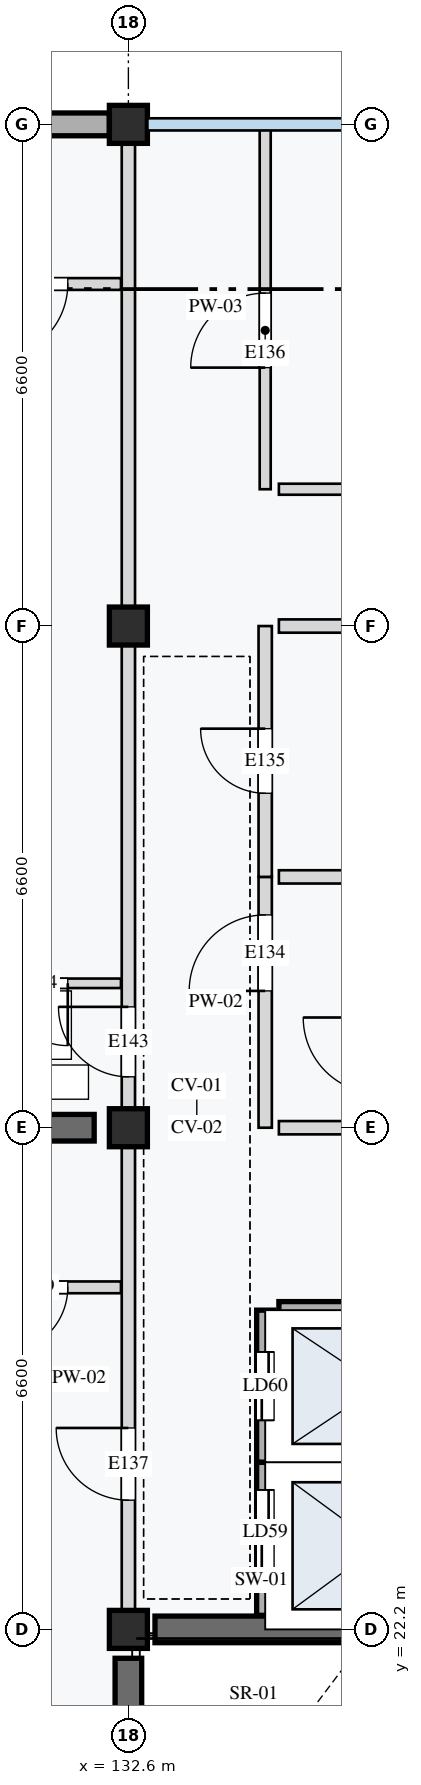
"""IFC4 building model, lengths in metres.
Left out: names, types, materials, properties, quantities, classifications, styles, units other than length and angle.
Written with IfcOpenShell. Run it as: python <this file> out.ifc"""

import sys

from ifc_helpers import new_model, si_unit, direction, frame, frame_2d, origin, origin_2d, place, context, subcontext, project, spatial, rectangle, extrude, element, fill, save


model = new_model("IFC4")
c1 = context("Model", 3, precision=1e-05, world=origin(), true_north=direction((0.0, 1.0)))
c2 = subcontext(c1, "Body", "Model", "MODEL_VIEW")
j1 = project(units=[si_unit("LENGTHUNIT", "METRE"), si_unit("PLANEANGLEUNIT", "RADIAN")], contexts=[c1])
p1 = place(None, origin())
s1 = spatial("IfcSite", under=j1, at=p1, CompositionType="ELEMENT")
p2 = place(p1, origin())
s2 = spatial("IfcBuilding", under=s1, at=p2, CompositionType="ELEMENT")
p3 = place(p2, frame((0.0, 0.0, 8.4)))
s3 = spatial("IfcBuildingStorey", under=s2, at=p3, CompositionType="ELEMENT", Elevation=8.4)
for number, where, z_axis, x_axis in (
    (1, (132.6, 22.2, 0.0), (0.0, 0.0, 1.0), (1.0, 0.0, 0.0)),
    (2, (132.6, 28.8, 0.0), (0.0, 0.0, 1.0), (1.0, 0.0, 0.0)),
    (3, (132.6, 35.4, 0.0), (0.0, 0.0, 1.0), (1.0, 0.0, 0.0)),
    (4, (132.6, 42.0, 0.0), (0.0, 0.0, 1.0), (1.0, 0.0, 0.0)),
):
    element("IfcColumn", number, at=place(p3, frame(where, z_axis=z_axis, x_axis=x_axis)), inside=s3, PredefinedType="COLUMN", context=c2, shape_type="SweptSolid", body=[
        extrude(rectangle(XDim=0.5, YDim=0.5, at=origin_2d()), origin(), (0.0, 0.0, 1.0), 3.2),
    ])
p4 = place(p3, frame((132.6, 15.98, 0.0), z_axis=(0.0, 0.0, 1.0), x_axis=(0.0, 1.0, 0.0)))
e5 = element("IfcWall", 5, at=p4, inside=s3, PredefinedType="SHEAR", context=c2, shape_type="SweptSolid", body=[
    extrude(rectangle(XDim=5.84, YDim=0.35, at=frame_2d((2.92, 0.0))), origin(), (0.0, 0.0, 1.0), 2.96),
])
p5 = place(p3, frame((132.95, 22.2, 0.0), z_axis=(0.0, 0.0, 1.0), x_axis=(1.0, 0.0, 0.0)))
e6 = element("IfcWall", 6, at=p5, inside=s3, PredefinedType="SHEAR", context=c2, shape_type="SweptSolid", body=[
    extrude(rectangle(XDim=2.8, YDim=0.35, at=frame_2d((1.4, 0.0))), origin(), (0.0, 0.0, 1.0), 2.96),
])
p6 = place(p3, frame((126.45, 28.8, 0.0), z_axis=(0.0, 0.0, 1.0), x_axis=(1.0, 0.0, 0.0)))
e7 = element("IfcWall", 7, at=p6, inside=s3, PredefinedType="SHEAR", context=c2, shape_type="SweptSolid", body=[
    extrude(rectangle(XDim=5.7, YDim=0.35, at=frame_2d((2.85, 0.0))), origin(), (0.0, 0.0, 1.0), 2.96),
])
p7 = place(p3, frame((126.25, 42.0, 0.0), z_axis=(0.0, 0.0, 1.0), x_axis=(1.0, 0.0, 0.0)))
e8 = element("IfcWall", 8, at=p7, inside=s3, PredefinedType="STANDARD", context=c2, shape_type="SweptSolid", body=[
    extrude(rectangle(XDim=6.1, YDim=0.3, at=frame_2d((3.05, 0.0))), origin(), (0.0, 0.0, 1.0), 2.65),
])
p8 = place(p3, frame((134.4, 22.385, 0.0), z_axis=(0.0, 0.0, 1.0), x_axis=(0.0, 1.0, 0.0)))
e9 = element("IfcWall", 9, at=p8, inside=s3, PredefinedType="STANDARD", context=c2, shape_type="SweptSolid", body=[
    extrude(rectangle(XDim=2.015, YDim=0.225, at=frame_2d((1.007, 0.0))), origin(), (0.0, 0.0, 1.0), 2.96),
])
p9 = place(p8, frame((0.55, 0.0, 0.0)))
e10 = element("IfcOpeningElement", 10, at=p9, cuts=e9, PredefinedType="OPENING", context=c2, shape_type="SweptSolid", body=[
    extrude(rectangle(XDim=1.1, YDim=2.1, at=frame_2d((0.55, 1.05))), frame((0.0, 0.123, 0.0), z_axis=(0.0, -1.0, 0.0), x_axis=(1.0, 0.0, 0.0)), (0.0, 0.0, 1.0), 0.245),
])
p10 = place(p3, frame((134.4, 24.4, 0.0), z_axis=(0.0, 0.0, 1.0), x_axis=(0.0, 1.0, 0.0)))
e11 = element("IfcWall", 11, at=p10, inside=s3, PredefinedType="STANDARD", context=c2, shape_type="SweptSolid", body=[
    extrude(rectangle(XDim=2.0, YDim=0.225, at=frame_2d((1.0, 0.0))), origin(), (0.0, 0.0, 1.0), 2.96),
])
p11 = place(p10, frame((0.55, 0.0, 0.0)))
e12 = element("IfcOpeningElement", 12, at=p11, cuts=e11, PredefinedType="OPENING", context=c2, shape_type="SweptSolid", body=[
    extrude(rectangle(XDim=0.9, YDim=2.1, at=frame_2d((0.45, 1.05))), frame((0.0, 0.123, 0.0), z_axis=(0.0, -1.0, 0.0), x_axis=(1.0, 0.0, 0.0)), (0.0, 0.0, 1.0), 0.245),
])
for number, where, z_axis, x_axis in (
    (13, (134.58, 24.4, 0.0), (0.0, 0.0, 1.0), (1.0, 0.0, 0.0)),
    (14, (134.58, 26.4, 0.0), (0.0, 0.0, 1.0), (1.0, 0.0, 0.0)),
):
    element("IfcWall", number, at=place(p3, frame(where, z_axis=z_axis, x_axis=x_axis)), inside=s3, PredefinedType="STANDARD", context=c2, shape_type="SweptSolid", body=[
        extrude(rectangle(XDim=2.64, YDim=0.225, at=frame_2d((1.32, 0.0))), origin(), (0.0, 0.0, 1.0), 2.96),
    ])
p12 = place(p3, frame((134.4, 28.8, 0.0), z_axis=(0.0, 0.0, 1.0), x_axis=(0.0, 1.0, 0.0)))
e15 = element("IfcWall", 15, at=p12, inside=s3, PredefinedType="PARTITIONING", context=c2, shape_type="SweptSolid", body=[
    extrude(rectangle(XDim=3.3, YDim=0.175, at=frame_2d((1.65, 0.0))), origin(), (0.0, 0.0, 1.0), 2.96),
])
p13 = place(p12, frame((1.8, 0.0, 0.0)))
e16 = element("IfcOpeningElement", 16, at=p13, cuts=e15, PredefinedType="OPENING", context=c2, shape_type="SweptSolid", body=[
    extrude(rectangle(XDim=1.0, YDim=2.16, at=frame_2d((0.5, 1.08))), frame((0.0, 0.097, 0.0), z_axis=(0.0, -1.0, 0.0), x_axis=(1.0, 0.0, 0.0)), (0.0, 0.0, 1.0), 0.195),
])
p14 = place(p3, frame((134.4, 32.1, 0.0), z_axis=(0.0, 0.0, 1.0), x_axis=(0.0, 1.0, 0.0)))
e17 = element("IfcWall", 17, at=p14, inside=s3, PredefinedType="PARTITIONING", context=c2, shape_type="SweptSolid", body=[
    extrude(rectangle(XDim=3.3, YDim=0.175, at=frame_2d((1.65, 0.0))), origin(), (0.0, 0.0, 1.0), 2.96),
])
p15 = place(p14, frame((1.1, 0.0, 0.0)))
e18 = element("IfcOpeningElement", 18, at=p15, cuts=e17, PredefinedType="OPENING", context=c2, shape_type="SweptSolid", body=[
    extrude(rectangle(XDim=0.85, YDim=2.0, at=frame_2d((0.425, 1.0))), frame((0.0, 0.097, 0.0), z_axis=(0.0, -1.0, 0.0), x_axis=(1.0, 0.0, 0.0)), (0.0, 0.0, 1.0), 0.195),
])
for number, where, z_axis, x_axis in (
    (19, (134.58, 28.8, 0.0), (0.0, 0.0, 1.0), (1.0, 0.0, 0.0)),
    (20, (134.58, 32.1, 0.0), (0.0, 0.0, 1.0), (1.0, 0.0, 0.0)),
    (21, (134.58, 35.4, 0.0), (0.0, 0.0, 1.0), (1.0, 0.0, 0.0)),
):
    element("IfcWall", number, at=place(p3, frame(where, z_axis=z_axis, x_axis=x_axis)), inside=s3, PredefinedType="PARTITIONING", context=c2, shape_type="SweptSolid", body=[
        extrude(rectangle(XDim=1.14, YDim=0.175, at=frame_2d((0.57, 0.0))), origin(), (0.0, 0.0, 1.0), 2.96),
    ])
p16 = place(p3, frame((134.4, 37.2, 0.0), z_axis=(0.0, 0.0, 1.0), x_axis=(0.0, 1.0, 0.0)))
e22 = element("IfcWall", 22, at=p16, inside=s3, PredefinedType="PARTITIONING", context=c2, shape_type="SweptSolid", body=[
    extrude(rectangle(XDim=4.8, YDim=0.145, at=frame_2d((2.4, 0.0))), origin(), (0.0, 0.0, 1.0), 2.96),
])
p17 = place(p16, frame((1.6, 0.0, 0.0)))
e23 = element("IfcOpeningElement", 23, at=p17, cuts=e22, PredefinedType="OPENING", context=c2, shape_type="SweptSolid", body=[
    extrude(rectangle(XDim=0.98, YDim=2.12, at=frame_2d((0.49, 1.06))), frame((0.0, 0.083, 0.0), z_axis=(0.0, -1.0, 0.0), x_axis=(1.0, 0.0, 0.0)), (0.0, 0.0, 1.0), 0.165),
])
p18 = place(p3, frame((134.58, 37.2, 0.0), z_axis=(0.0, 0.0, 1.0), x_axis=(1.0, 0.0, 0.0)))
e24 = element("IfcWall", 24, at=p18, inside=s3, PredefinedType="PARTITIONING", context=c2, shape_type="SweptSolid", body=[
    extrude(rectangle(XDim=2.64, YDim=0.145, at=frame_2d((1.32, 0.0))), origin(), (0.0, 0.0, 1.0), 2.96),
])
p19 = place(p3, frame((132.6, 22.2, 0.0), z_axis=(0.0, 0.0, 1.0), x_axis=(0.0, 1.0, 0.0)))
e25 = element("IfcWall", 25, at=p19, inside=s3, PredefinedType="PARTITIONING", context=c2, shape_type="SweptSolid", body=[
    extrude(rectangle(XDim=6.6, YDim=0.175, at=frame_2d((3.3, 0.0))), origin(), (0.0, 0.0, 1.0), 2.55),
])
p20 = place(p19, frame((1.7, 0.0, 0.0)))
e26 = element("IfcOpeningElement", 26, at=p20, cuts=e25, PredefinedType="OPENING", context=c2, shape_type="SweptSolid", body=[
    extrude(rectangle(XDim=0.95, YDim=2.1, at=frame_2d((0.475, 1.05))), frame((0.0, 0.097, 0.0), z_axis=(0.0, -1.0, 0.0), x_axis=(1.0, 0.0, 0.0)), (0.0, 0.0, 1.0), 0.195),
])
p21 = place(p3, frame((132.502, 26.7, 0.0), z_axis=(0.0, 0.0, 1.0), x_axis=(-1.0, 0.0, 0.0)))
e27 = element("IfcWall", 27, at=p21, inside=s3, PredefinedType="PARTITIONING", context=c2, shape_type="SweptSolid", body=[
    extrude(rectangle(XDim=2.302, YDim=0.155, at=frame_2d((1.151, 0.0))), origin(), (0.0, 0.0, 1.0), 2.96),
])
p22 = place(p21, frame((0.7, 0.0, 0.0)))
e28 = element("IfcOpeningElement", 28, at=p22, cuts=e27, PredefinedType="OPENING", context=c2, shape_type="SweptSolid", body=[
    extrude(rectangle(XDim=0.86, YDim=2.12, at=frame_2d((0.43, 1.06))), frame((0.0, 0.087, 0.0), z_axis=(0.0, -1.0, 0.0), x_axis=(1.0, 0.0, 0.0)), (0.0, 0.0, 1.0), 0.175),
])
p23 = place(p3, frame((132.6, 28.8, 0.0), z_axis=(0.0, 0.0, 1.0), x_axis=(0.0, 1.0, 0.0)))
e29 = element("IfcWall", 29, at=p23, inside=s3, PredefinedType="PARTITIONING", context=c2, shape_type="SweptSolid", body=[
    extrude(rectangle(XDim=13.2, YDim=0.175, at=frame_2d((6.6, 0.0))), origin(), (0.0, 0.0, 1.0), 2.55),
])
p24 = place(p23, frame((0.67, 0.0, 0.0)))
e30 = element("IfcOpeningElement", 30, at=p24, cuts=e29, PredefinedType="OPENING", context=c2, shape_type="SweptSolid", body=[
    extrude(rectangle(XDim=0.92, YDim=2.14, at=frame_2d((0.46, 1.07))), frame((0.0, 0.097, 0.0), z_axis=(0.0, -1.0, 0.0), x_axis=(1.0, 0.0, 0.0)), (0.0, 0.0, 1.0), 0.195),
])
p25 = place(p3, frame((132.502, 30.7, 0.0), z_axis=(0.0, 0.0, 1.0), x_axis=(-1.0, 0.0, 0.0)))
e31 = element("IfcWall", 31, at=p25, inside=s3, PredefinedType="PARTITIONING", context=c2, shape_type="SweptSolid", body=[
    extrude(rectangle(XDim=2.302, YDim=0.125, at=frame_2d((1.151, 0.0))), origin(), (0.0, 0.0, 1.0), 2.96),
])
p26 = place(p25, frame((0.7, 0.0, 0.0)))
e32 = element("IfcOpeningElement", 32, at=p26, cuts=e31, PredefinedType="OPENING", context=c2, shape_type="SweptSolid", body=[
    extrude(rectangle(XDim=0.82, YDim=2.05, at=frame_2d((0.41, 1.025))), frame((0.0, 0.073, 0.0), z_axis=(0.0, -1.0, 0.0), x_axis=(1.0, 0.0, 0.0)), (0.0, 0.0, 1.0), 0.145),
])
p27 = place(p3, frame((132.502, 39.9, 0.0), z_axis=(0.0, 0.0, 1.0), x_axis=(-1.0, 0.0, 0.0)))
e33 = element("IfcWall", 33, at=p27, inside=s3, PredefinedType="PARTITIONING", context=c2, shape_type="SweptSolid", body=[
    extrude(rectangle(XDim=2.302, YDim=0.155, at=frame_2d((1.151, 0.0))), origin(), (0.0, 0.0, 1.0), 2.96),
])
p28 = place(p27, frame((0.7, 0.0, 0.0)))
e34 = element("IfcOpeningElement", 34, at=p28, cuts=e33, PredefinedType="OPENING", context=c2, shape_type="SweptSolid", body=[
    extrude(rectangle(XDim=0.98, YDim=2.12, at=frame_2d((0.49, 1.06))), frame((0.0, 0.087, 0.0), z_axis=(0.0, -1.0, 0.0), x_axis=(1.0, 0.0, 0.0)), (0.0, 0.0, 1.0), 0.175),
])
p29 = place(p9, origin())
e35 = element("IfcDoor", 35, at=p29, inside=s3, OperationType="DOUBLE_DOOR_SLIDING", PredefinedType="DOOR", context=c2, shape_type="SweptSolid", body=[
    extrude(rectangle(XDim=1.1, YDim=2.1, at=frame_2d((0.55, 1.05))), frame((0.0, 0.025, 0.0), z_axis=(0.0, -1.0, 0.0), x_axis=(1.0, 0.0, 0.0)), (0.0, 0.0, 1.0), 0.05),
])
fill(e10, e35)
p30 = place(p11, origin())
e36 = element("IfcDoor", 36, at=p30, inside=s3, OperationType="DOUBLE_DOOR_SLIDING", PredefinedType="DOOR", context=c2, shape_type="SweptSolid", body=[
    extrude(rectangle(XDim=0.9, YDim=2.1, at=frame_2d((0.45, 1.05))), frame((0.0, 0.025, 0.0), z_axis=(0.0, -1.0, 0.0), x_axis=(1.0, 0.0, 0.0)), (0.0, 0.0, 1.0), 0.05),
])
fill(e12, e36)
p31 = place(p13, origin())
e37 = element("IfcDoor", 37, at=p31, inside=s3, OperationType="SINGLE_SWING_LEFT", PredefinedType="DOOR", context=c2, shape_type="SweptSolid", body=[
    extrude(rectangle(XDim=1.0, YDim=2.16, at=frame_2d((0.5, 1.08))), frame((0.0, 0.025, 0.0), z_axis=(0.0, -1.0, 0.0), x_axis=(1.0, 0.0, 0.0)), (0.0, 0.0, 1.0), 0.05),
])
fill(e16, e37)
p32 = place(p15, origin())
e38 = element("IfcDoor", 38, at=p32, inside=s3, OperationType="SINGLE_SWING_RIGHT", PredefinedType="DOOR", context=c2, shape_type="SweptSolid", body=[
    extrude(rectangle(XDim=0.85, YDim=2.0, at=frame_2d((0.425, 1.0))), frame((0.0, 0.025, 0.0), z_axis=(0.0, -1.0, 0.0), x_axis=(1.0, 0.0, 0.0)), (0.0, 0.0, 1.0), 0.05),
])
fill(e18, e38)
p33 = place(p17, origin())
e39 = element("IfcDoor", 39, at=p33, inside=s3, OperationType="SINGLE_SWING_LEFT", PredefinedType="DOOR", context=c2, shape_type="SweptSolid", body=[
    extrude(rectangle(XDim=0.98, YDim=2.12, at=frame_2d((0.49, 1.06))), frame((0.0, 0.025, 0.0), z_axis=(0.0, -1.0, 0.0), x_axis=(1.0, 0.0, 0.0)), (0.0, 0.0, 1.0), 0.05),
])
fill(e23, e39)
p34 = place(p20, origin())
e40 = element("IfcDoor", 40, at=p34, inside=s3, OperationType="SINGLE_SWING_RIGHT", PredefinedType="DOOR", context=c2, shape_type="SweptSolid", body=[
    extrude(rectangle(XDim=0.95, YDim=2.1, at=frame_2d((0.475, 1.05))), frame((0.0, 0.025, 0.0), z_axis=(0.0, -1.0, 0.0), x_axis=(1.0, 0.0, 0.0)), (0.0, 0.0, 1.0), 0.05),
])
fill(e26, e40)
p35 = place(p22, origin())
e41 = element("IfcDoor", 41, at=p35, inside=s3, OperationType="SINGLE_SWING_RIGHT", PredefinedType="DOOR", context=c2, shape_type="SweptSolid", body=[
    extrude(rectangle(XDim=0.86, YDim=2.12, at=frame_2d((0.43, 1.06))), frame((0.0, 0.025, 0.0), z_axis=(0.0, -1.0, 0.0), x_axis=(1.0, 0.0, 0.0)), (0.0, 0.0, 1.0), 0.05),
])
fill(e28, e41)
p36 = place(p24, origin())
e42 = element("IfcDoor", 42, at=p36, inside=s3, OperationType="SINGLE_SWING_RIGHT", PredefinedType="DOOR", context=c2, shape_type="SweptSolid", body=[
    extrude(rectangle(XDim=0.92, YDim=2.14, at=frame_2d((0.46, 1.07))), frame((0.0, 0.025, 0.0), z_axis=(0.0, -1.0, 0.0), x_axis=(1.0, 0.0, 0.0)), (0.0, 0.0, 1.0), 0.05),
])
fill(e30, e42)
p37 = place(p26, origin())
e43 = element("IfcDoor", 43, at=p37, inside=s3, OperationType="SINGLE_SWING_LEFT", PredefinedType="DOOR", context=c2, shape_type="SweptSolid", body=[
    extrude(rectangle(XDim=0.82, YDim=2.05, at=frame_2d((0.41, 1.025))), frame((0.0, 0.025, 0.0), z_axis=(0.0, -1.0, 0.0), x_axis=(1.0, 0.0, 0.0)), (0.0, 0.0, 1.0), 0.05),
])
fill(e32, e43)
p38 = place(p28, origin())
e44 = element("IfcDoor", 44, at=p38, inside=s3, OperationType="SINGLE_SWING_RIGHT", PredefinedType="DOOR", context=c2, shape_type="SweptSolid", body=[
    extrude(rectangle(XDim=0.98, YDim=2.12, at=frame_2d((0.49, 1.06))), frame((0.0, 0.025, 0.0), z_axis=(0.0, -1.0, 0.0), x_axis=(1.0, 0.0, 0.0)), (0.0, 0.0, 1.0), 0.05),
])
fill(e34, e44)
save(model, sys.argv[1])
